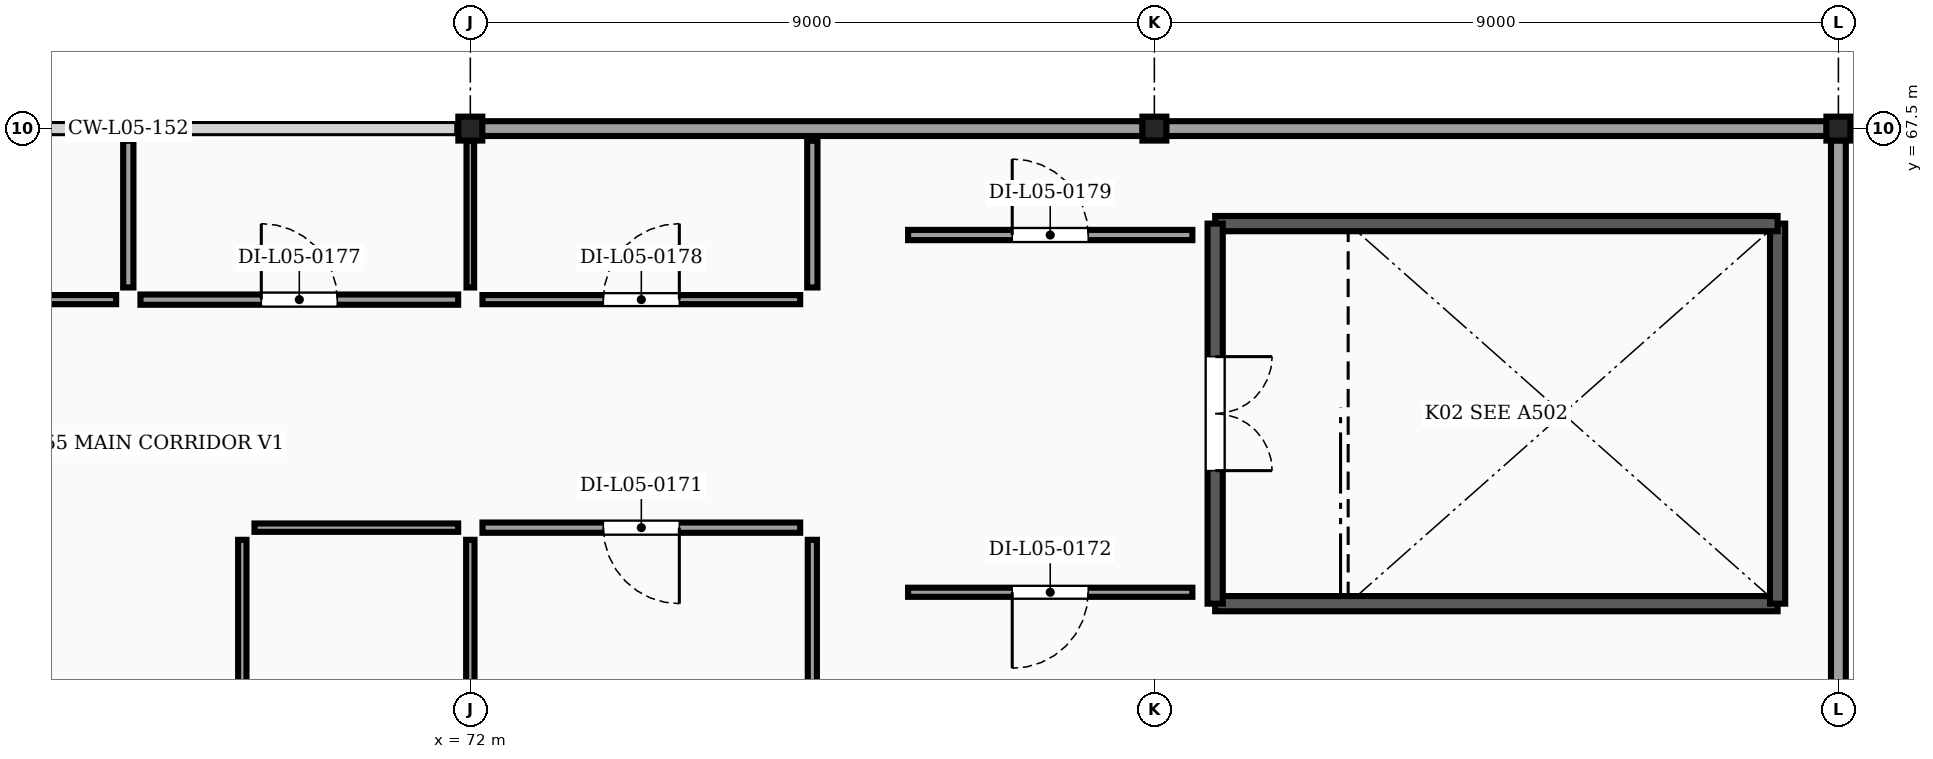
"""IFC4 building model, lengths in metres.
Left out: names, types, materials, properties, quantities, classifications, styles, units other than length and angle.
Written with IfcOpenShell. Run it as: python <this file> out.ifc"""

import sys

from ifc_helpers import new_model, si_unit, direction, frame, frame_2d, origin, origin_2d, place, context, subcontext, project, spatial, rectangle, extrude, element, fill, save


model = new_model("IFC4")
c1 = context("Model", 3, precision=1e-05, world=origin(), true_north=direction((0.0, 1.0)))
c2 = subcontext(c1, "Body", "Model", "MODEL_VIEW")
j1 = project(units=[si_unit("LENGTHUNIT", "METRE"), si_unit("PLANEANGLEUNIT", "RADIAN")], contexts=[c1])
p1 = place(None, origin())
s1 = spatial("IfcSite", under=j1, at=p1, CompositionType="ELEMENT")
p2 = place(p1, origin())
s2 = spatial("IfcBuilding", under=s1, at=p2, CompositionType="ELEMENT")
p3 = place(p2, frame((0.0, 0.0, 19.9)))
s3 = spatial("IfcBuildingStorey", under=s2, at=p3, CompositionType="ELEMENT", Elevation=19.9)
for number, where, z_axis, x_axis in (
    (1, (72.0, 67.5, 0.0), (0.0, 0.0, 1.0), (1.0, 0.0, 0.0)),
    (2, (81.0, 67.5, 0.0), (0.0, 0.0, 1.0), (1.0, 0.0, 0.0)),
    (3, (90.0, 67.5, 0.0), (0.0, 0.0, 1.0), (1.0, 0.0, 0.0)),
):
    element("IfcColumn", number, at=place(p3, frame(where, z_axis=z_axis, x_axis=x_axis)), inside=s3, PredefinedType="COLUMN", context=c2, shape_type="SweptSolid", body=[
        extrude(rectangle(XDim=0.315, YDim=0.315, at=origin_2d()), origin(), (0.0, 0.0, 1.0), 3.8),
    ])
for number, where, z_axis, x_axis in (
    (4, (72.154, 67.5, 0.0), (0.0, 0.0, 1.0), (1.0, 0.0, 0.0)),
    (5, (81.154, 67.5, 0.0), (0.0, 0.0, 1.0), (1.0, 0.0, 0.0)),
):
    element("IfcWall", number, at=place(p3, frame(where, z_axis=z_axis, x_axis=x_axis)), inside=s3, PredefinedType="SOLIDWALL", context=c2, shape_type="SweptSolid", body=[
        extrude(rectangle(XDim=8.693, YDim=0.195, at=frame_2d((4.346, 0.0))), origin(), (0.0, 0.0, 1.0), 4.48),
    ])
p4 = place(p3, frame((90.0, 67.346, 0.0), z_axis=(0.0, 0.0, 1.0), x_axis=(0.0, -1.0, 0.0)))
e6 = element("IfcWall", 6, at=p4, inside=s3, PredefinedType="SOLIDWALL", context=c2, shape_type="SweptSolid", body=[
    extrude(rectangle(XDim=7.193, YDim=0.195, at=frame_2d((3.596, 0.0))), origin(), (0.0, 0.0, 1.0), 4.112),
])
p5 = place(p3, frame((81.8, 61.25, 0.0), z_axis=(0.0, 0.0, 1.0), x_axis=(1.0, 0.0, 0.0)))
e7 = element("IfcWall", 7, at=p5, inside=s3, PredefinedType="SHEAR", context=c2, shape_type="SweptSolid", body=[
    extrude(rectangle(XDim=7.4, YDim=0.2, at=frame_2d((3.7, 0.0))), origin(), (0.0, 0.0, 1.0), 5.1),
])
p6 = place(p3, frame((89.2, 61.25, 0.0), z_axis=(0.0, 0.0, 1.0), x_axis=(0.0, 1.0, 0.0)))
e8 = element("IfcWall", 8, at=p6, inside=s3, PredefinedType="SHEAR", context=c2, shape_type="SweptSolid", body=[
    extrude(rectangle(XDim=5.0, YDim=0.2, at=frame_2d((2.5, 0.0))), origin(), (0.0, 0.0, 1.0), 5.1),
])
p7 = place(p3, frame((89.2, 66.25, 0.0), z_axis=(0.0, 0.0, 1.0), x_axis=(-1.0, 0.0, 0.0)))
e9 = element("IfcWall", 9, at=p7, inside=s3, PredefinedType="SHEAR", context=c2, shape_type="SweptSolid", body=[
    extrude(rectangle(XDim=7.4, YDim=0.2, at=frame_2d((3.7, 0.0))), origin(), (0.0, 0.0, 1.0), 5.1),
])
p8 = place(p3, frame((81.8, 66.25, 0.0), z_axis=(0.0, 0.0, 1.0), x_axis=(0.0, -1.0, 0.0)))
e10 = element("IfcWall", 10, at=p8, inside=s3, PredefinedType="SHEAR", context=c2, shape_type="SweptSolid", body=[
    extrude(rectangle(XDim=5.0, YDim=0.2, at=frame_2d((2.5, 0.0))), origin(), (0.0, 0.0, 1.0), 5.1),
])
p9 = place(p8, frame((1.75, 0.0, 0.0)))
e11 = element("IfcOpeningElement", 11, at=p9, cuts=e10, PredefinedType="OPENING", context=c2, shape_type="SweptSolid", body=[
    extrude(rectangle(XDim=1.5, YDim=2.15, at=frame_2d((0.75, 1.075))), frame((0.0, 0.11, 0.0), z_axis=(0.0, -1.0, 0.0), x_axis=(1.0, 0.0, 0.0)), (0.0, 0.0, 1.0), 0.22),
])
p10 = place(p3, frame((69.0, 62.09, 0.0), z_axis=(0.0, 0.0, 1.0), x_axis=(0.0, -1.0, 0.0)))
e12 = element("IfcWall", 12, at=p10, inside=s3, PredefinedType="PARTITIONING", context=c2, shape_type="SweptSolid", body=[
    extrude(rectangle(XDim=6.88, YDim=0.11, at=frame_2d((3.44, 0.0))), origin(), (0.0, 0.0, 1.0), 5.1),
])
p11 = place(p10, frame((2.94, 0.0, 0.0)))
e13 = element("IfcOpeningElement", 13, at=p11, cuts=e12, PredefinedType="OPENING", context=c2, shape_type="SweptSolid", body=[
    extrude(rectangle(XDim=1.0, YDim=2.15, at=frame_2d((0.5, 1.075))), frame((0.0, 0.065, 0.0), z_axis=(0.0, -1.0, 0.0), x_axis=(1.0, 0.0, 0.0)), (0.0, 0.0, 1.0), 0.13),
])
p12 = place(p3, frame((71.84, 62.25, 0.0), z_axis=(0.0, 0.0, 1.0), x_axis=(-1.0, 0.0, 0.0)))
e14 = element("IfcWall", 14, at=p12, inside=s3, PredefinedType="PARTITIONING", context=c2, shape_type="SweptSolid", body=[
    extrude(rectangle(XDim=2.68, YDim=0.11, at=frame_2d((1.34, 0.0))), origin(), (0.0, 0.0, 1.0), 5.1),
])
p13 = place(p3, frame((72.0, 52.66, 0.0), z_axis=(0.0, 0.0, 1.0), x_axis=(0.0, 1.0, 0.0)))
e15 = element("IfcWall", 15, at=p13, inside=s3, PredefinedType="PARTITIONING", context=c2, shape_type="SweptSolid", body=[
    extrude(rectangle(XDim=9.43, YDim=0.11, at=frame_2d((4.715, 0.0))), origin(), (0.0, 0.0, 1.0), 4.112),
])
p14 = place(p3, frame((76.34, 62.25, 0.0), z_axis=(0.0, 0.0, 1.0), x_axis=(-1.0, 0.0, 0.0)))
e16 = element("IfcWall", 16, at=p14, inside=s3, PredefinedType="PARTITIONING", context=c2, shape_type="SweptSolid", body=[
    extrude(rectangle(XDim=4.18, YDim=0.135, at=frame_2d((2.09, 0.0))), origin(), (0.0, 0.0, 1.0), 5.1),
])
p15 = place(p14, frame((1.59, 0.0, 0.0)))
e17 = element("IfcOpeningElement", 17, at=p15, cuts=e16, PredefinedType="OPENING", context=c2, shape_type="SweptSolid", body=[
    extrude(rectangle(XDim=1.0, YDim=2.15, at=frame_2d((0.5, 1.075))), frame((0.0, 0.077, 0.0), z_axis=(0.0, -1.0, 0.0), x_axis=(1.0, 0.0, 0.0)), (0.0, 0.0, 1.0), 0.155),
])
p16 = place(p3, frame((81.5, 61.4, 0.0), z_axis=(0.0, 0.0, 1.0), x_axis=(-1.0, 0.0, 0.0)))
e18 = element("IfcWall", 18, at=p16, inside=s3, PredefinedType="PARTITIONING", context=c2, shape_type="SweptSolid", body=[
    extrude(rectangle(XDim=3.74, YDim=0.12, at=frame_2d((1.87, 0.0))), origin(), (0.0, 0.0, 1.0), 5.1),
])
p17 = place(p16, frame((1.37, 0.0, 0.0)))
e19 = element("IfcOpeningElement", 19, at=p17, cuts=e18, PredefinedType="OPENING", context=c2, shape_type="SweptSolid", body=[
    extrude(rectangle(XDim=1.0, YDim=2.15, at=frame_2d((0.5, 1.075))), frame((0.0, 0.07, 0.0), z_axis=(0.0, -1.0, 0.0), x_axis=(1.0, 0.0, 0.0)), (0.0, 0.0, 1.0), 0.14),
])
p18 = place(p3, frame((58.66, 65.25, 0.0), z_axis=(0.0, 0.0, 1.0), x_axis=(1.0, 0.0, 0.0)))
e20 = element("IfcWall", 20, at=p18, inside=s3, PredefinedType="PARTITIONING", context=c2, shape_type="SweptSolid", body=[
    extrude(rectangle(XDim=8.68, YDim=0.12, at=frame_2d((4.34, 0.0))), origin(), (0.0, 0.0, 1.0), 5.1),
])
p19 = place(p18, frame((3.84, 0.0, 0.0)))
e21 = element("IfcOpeningElement", 21, at=p19, cuts=e20, PredefinedType="OPENING", context=c2, shape_type="SweptSolid", body=[
    extrude(rectangle(XDim=1.0, YDim=2.15, at=frame_2d((0.5, 1.075))), frame((0.0, 0.07, 0.0), z_axis=(0.0, -1.0, 0.0), x_axis=(1.0, 0.0, 0.0)), (0.0, 0.0, 1.0), 0.14),
])
p20 = place(p18, frame((5.19, 0.0, 1.02)))
e22 = element("IfcOpeningElement", 22, at=p20, cuts=e20, PredefinedType="OPENING", context=c2, shape_type="SweptSolid", body=[
    extrude(rectangle(XDim=1.62, YDim=1.2, at=frame_2d((0.81, 0.6))), frame((0.0, 0.07, 0.0), z_axis=(0.0, -1.0, 0.0), x_axis=(1.0, 0.0, 0.0)), (0.0, 0.0, 1.0), 0.14),
])
p21 = place(p3, frame((67.66, 65.25, 0.0), z_axis=(0.0, 0.0, 1.0), x_axis=(1.0, 0.0, 0.0)))
e23 = element("IfcWall", 23, at=p21, inside=s3, PredefinedType="PARTITIONING", context=c2, shape_type="SweptSolid", body=[
    extrude(rectangle(XDim=4.18, YDim=0.135, at=frame_2d((2.09, 0.0))), origin(), (0.0, 0.0, 1.0), 5.1),
])
p22 = place(p21, frame((1.59, 0.0, 0.0)))
e24 = element("IfcOpeningElement", 24, at=p22, cuts=e23, PredefinedType="OPENING", context=c2, shape_type="SweptSolid", body=[
    extrude(rectangle(XDim=1.0, YDim=2.15, at=frame_2d((0.5, 1.075))), frame((0.0, 0.077, 0.0), z_axis=(0.0, -1.0, 0.0), x_axis=(1.0, 0.0, 0.0)), (0.0, 0.0, 1.0), 0.155),
])
p23 = place(p3, frame((72.16, 65.25, 0.0), z_axis=(0.0, 0.0, 1.0), x_axis=(1.0, 0.0, 0.0)))
e25 = element("IfcWall", 25, at=p23, inside=s3, PredefinedType="PARTITIONING", context=c2, shape_type="SweptSolid", body=[
    extrude(rectangle(XDim=4.18, YDim=0.12, at=frame_2d((2.09, 0.0))), origin(), (0.0, 0.0, 1.0), 5.1),
])
p24 = place(p23, frame((1.59, 0.0, 0.0)))
e26 = element("IfcOpeningElement", 26, at=p24, cuts=e25, PredefinedType="OPENING", context=c2, shape_type="SweptSolid", body=[
    extrude(rectangle(XDim=1.0, YDim=2.15, at=frame_2d((0.5, 1.075))), frame((0.0, 0.07, 0.0), z_axis=(0.0, -1.0, 0.0), x_axis=(1.0, 0.0, 0.0)), (0.0, 0.0, 1.0), 0.14),
])
p25 = place(p3, frame((77.76, 66.1, 0.0), z_axis=(0.0, 0.0, 1.0), x_axis=(1.0, 0.0, 0.0)))
e27 = element("IfcWall", 27, at=p25, inside=s3, PredefinedType="PARTITIONING", context=c2, shape_type="SweptSolid", body=[
    extrude(rectangle(XDim=3.74, YDim=0.135, at=frame_2d((1.87, 0.0))), origin(), (0.0, 0.0, 1.0), 5.1),
])
p26 = place(p25, frame((1.37, 0.0, 0.0)))
e28 = element("IfcOpeningElement", 28, at=p26, cuts=e27, PredefinedType="OPENING", context=c2, shape_type="SweptSolid", body=[
    extrude(rectangle(XDim=1.0, YDim=2.15, at=frame_2d((0.5, 1.075))), frame((0.0, 0.077, 0.0), z_axis=(0.0, -1.0, 0.0), x_axis=(1.0, 0.0, 0.0)), (0.0, 0.0, 1.0), 0.155),
])
p27 = place(p3, frame((76.5, 52.66, 0.0), z_axis=(0.0, 0.0, 1.0), x_axis=(0.0, 1.0, 0.0)))
e29 = element("IfcWall", 29, at=p27, inside=s3, PredefinedType="PARTITIONING", context=c2, shape_type="SweptSolid", body=[
    extrude(rectangle(XDim=9.43, YDim=0.12, at=frame_2d((4.715, 0.0))), origin(), (0.0, 0.0, 1.0), 5.1),
])
p28 = place(p3, frame((67.5, 65.41, 0.0), z_axis=(0.0, 0.0, 1.0), x_axis=(0.0, 1.0, 0.0)))
e30 = element("IfcWall", 30, at=p28, inside=s3, PredefinedType="PARTITIONING", context=c2, shape_type="SweptSolid", body=[
    extrude(rectangle(XDim=1.93, YDim=0.135, at=frame_2d((0.965, 0.0))), origin(), (0.0, 0.0, 1.0), 5.1),
])
p29 = place(p3, frame((72.0, 65.41, 0.0), z_axis=(0.0, 0.0, 1.0), x_axis=(0.0, 1.0, 0.0)))
e31 = element("IfcWall", 31, at=p29, inside=s3, PredefinedType="PARTITIONING", context=c2, shape_type="SweptSolid", body=[
    extrude(rectangle(XDim=1.93, YDim=0.1, at=frame_2d((0.965, 0.0))), origin(), (0.0, 0.0, 1.0), 4.112),
])
p30 = place(p3, frame((76.5, 65.41, 0.0), z_axis=(0.0, 0.0, 1.0), x_axis=(0.0, 1.0, 0.0)))
e32 = element("IfcWall", 32, at=p30, inside=s3, PredefinedType="PARTITIONING", context=c2, shape_type="SweptSolid", body=[
    extrude(rectangle(XDim=1.93, YDim=0.135, at=frame_2d((0.965, 0.0))), origin(), (0.0, 0.0, 1.0), 5.1),
])
p31 = place(p9, origin())
e33 = element("IfcDoor", 33, at=p31, inside=s3, OperationType="DOUBLE_DOOR_SINGLE_SWING", PredefinedType="DOOR", context=c2, shape_type="SweptSolid", body=[
    extrude(rectangle(XDim=1.5, YDim=2.15, at=frame_2d((0.75, 1.075))), frame((0.0, 0.025, 0.0), z_axis=(0.0, -1.0, 0.0), x_axis=(1.0, 0.0, 0.0)), (0.0, 0.0, 1.0), 0.05),
])
fill(e11, e33)
p32 = place(p15, origin())
e34 = element("IfcDoor", 34, at=p32, inside=s3, OperationType="SINGLE_SWING_LEFT", PredefinedType="DOOR", context=c2, shape_type="SweptSolid", body=[
    extrude(rectangle(XDim=1.0, YDim=2.15, at=frame_2d((0.5, 1.075))), frame((0.0, 0.025, 0.0), z_axis=(0.0, -1.0, 0.0), x_axis=(1.0, 0.0, 0.0)), (0.0, 0.0, 1.0), 0.05),
])
fill(e17, e34)
p33 = place(p17, origin())
e35 = element("IfcDoor", 35, at=p33, inside=s3, OperationType="SINGLE_SWING_RIGHT", PredefinedType="DOOR", context=c2, shape_type="SweptSolid", body=[
    extrude(rectangle(XDim=1.0, YDim=2.15, at=frame_2d((0.5, 1.075))), frame((0.0, 0.025, 0.0), z_axis=(0.0, -1.0, 0.0), x_axis=(1.0, 0.0, 0.0)), (0.0, 0.0, 1.0), 0.05),
])
fill(e19, e35)
p34 = place(p22, origin())
e36 = element("IfcDoor", 36, at=p34, inside=s3, OperationType="SINGLE_SWING_LEFT", PredefinedType="DOOR", context=c2, shape_type="SweptSolid", body=[
    extrude(rectangle(XDim=1.0, YDim=2.15, at=frame_2d((0.5, 1.075))), frame((0.0, 0.025, 0.0), z_axis=(0.0, -1.0, 0.0), x_axis=(1.0, 0.0, 0.0)), (0.0, 0.0, 1.0), 0.05),
])
fill(e24, e36)
p35 = place(p24, origin())
e37 = element("IfcDoor", 37, at=p35, inside=s3, OperationType="SINGLE_SWING_RIGHT", PredefinedType="DOOR", context=c2, shape_type="SweptSolid", body=[
    extrude(rectangle(XDim=1.0, YDim=2.15, at=frame_2d((0.5, 1.075))), frame((0.0, 0.025, 0.0), z_axis=(0.0, -1.0, 0.0), x_axis=(1.0, 0.0, 0.0)), (0.0, 0.0, 1.0), 0.05),
])
fill(e26, e37)
p36 = place(p26, origin())
e38 = element("IfcDoor", 38, at=p36, inside=s3, OperationType="SINGLE_SWING_LEFT", PredefinedType="DOOR", context=c2, shape_type="SweptSolid", body=[
    extrude(rectangle(XDim=1.0, YDim=2.15, at=frame_2d((0.5, 1.075))), frame((0.0, 0.025, 0.0), z_axis=(0.0, -1.0, 0.0), x_axis=(1.0, 0.0, 0.0)), (0.0, 0.0, 1.0), 0.05),
])
fill(e28, e38)
save(model, sys.argv[1])
